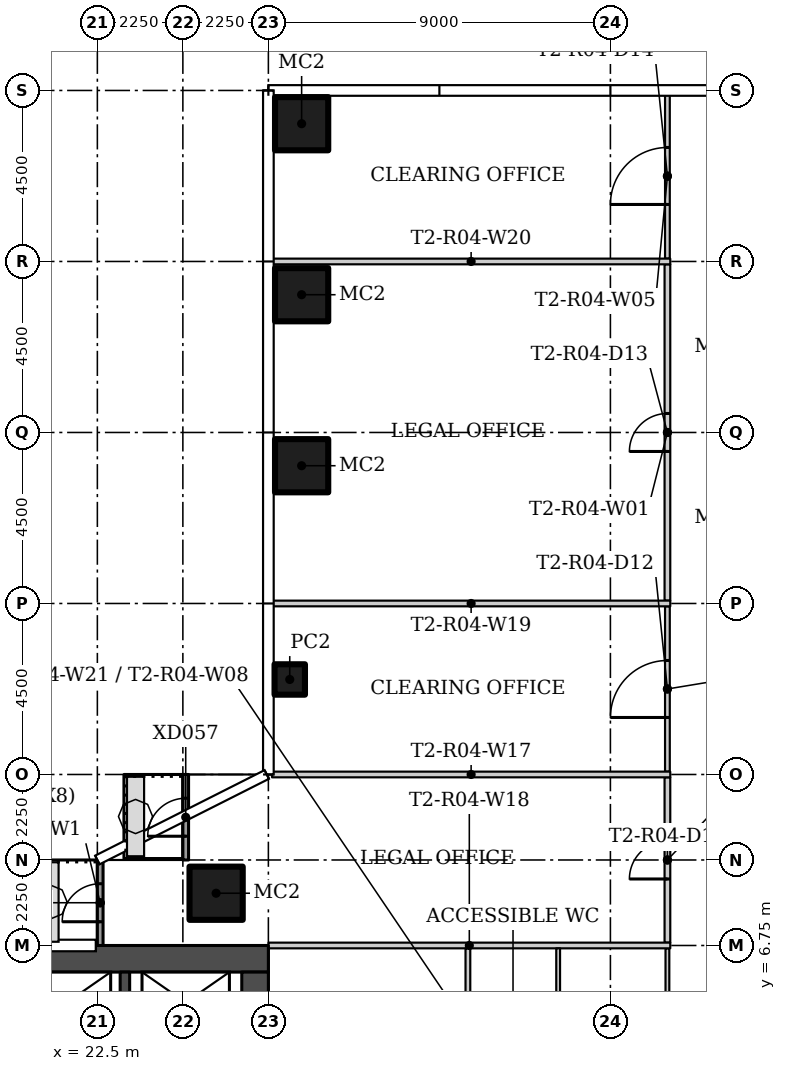
"""IFC4 building model, lengths in metres.
Left out: names, types, materials, properties, quantities, classifications, styles, units other than length and angle.
Written with IfcOpenShell. Run it as: python <this file> out.ifc"""

import sys

from ifc_helpers import new_model, si_unit, direction, frame, frame_2d, origin, origin_2d, place, context, subcontext, project, spatial, rectangle, hollow_rectangle, extrude, element, fill, save


model = new_model("IFC4")
c1 = context("Model", 3, precision=1e-05, world=origin(), true_north=direction((0.0, 1.0)))
c2 = subcontext(c1, "Body", "Model", "MODEL_VIEW")
j1 = project(units=[si_unit("LENGTHUNIT", "METRE"), si_unit("PLANEANGLEUNIT", "RADIAN")], contexts=[c1])
p1 = place(None, origin())
s1 = spatial("IfcSite", under=j1, at=p1, CompositionType="ELEMENT")
p2 = place(p1, origin())
s2 = spatial("IfcBuilding", under=s1, at=p2, CompositionType="ELEMENT")
p3 = place(p2, frame((0.0, 0.0, 49.8)))
s3 = spatial("IfcBuildingStorey", under=s2, at=p3, CompositionType="ELEMENT", Elevation=49.8)
p4 = place(p3, frame((25.625, 8.125, 0.0)))
e1 = element("IfcColumn", 1, at=p4, inside=s3, PredefinedType="COLUMN", context=c2, shape_type="SweptSolid", body=[
    extrude(hollow_rectangle(XDim=1.4, YDim=1.4, WallThickness=0.05, at=origin_2d()), origin(), (0.0, 0.0, 1.0), 3.55),
])
p5 = place(p3, frame((27.562, 13.75, 0.0)))
e2 = element("IfcColumn", 2, at=p5, inside=s3, PredefinedType="COLUMN", context=c2, shape_type="SweptSolid", body=[
    extrude(hollow_rectangle(XDim=0.8, YDim=0.8, WallThickness=0.025, at=origin_2d()), origin(), (0.0, 0.0, 1.0), 3.55),
])
for number, where in (
    (3, (27.875, 19.375, 0.0)),
    (4, (27.875, 23.875, 0.0)),
    (5, (27.875, 28.375, 0.0)),
):
    element("IfcColumn", number, at=place(p3, frame(where)), inside=s3, PredefinedType="COLUMN", context=c2, shape_type="SweptSolid", body=[
        extrude(hollow_rectangle(XDim=1.4, YDim=1.4, WallThickness=0.05, at=origin_2d()), origin(), (0.0, 0.0, 1.0), 3.55),
    ])
p6 = place(p3, frame((37.5, 15.825, 0.0), z_axis=(0.0, 0.0, 1.0), x_axis=(0.0, 1.0, 0.0)))
e6 = element("IfcWall", 6, at=p6, inside=s3, PredefinedType="PARTITIONING", context=c2, shape_type="SweptSolid", body=[
    extrude(rectangle(XDim=8.85, YDim=0.15, at=frame_2d((4.425, 0.0))), origin(), (0.0, 0.0, 1.0), 3.55),
])
p7 = place(p6, frame((3.925, 0.0, 0.0)))
e7 = element("IfcOpeningElement", 7, at=p7, cuts=e6, PredefinedType="OPENING", context=c2, shape_type="SweptSolid", body=[
    extrude(rectangle(XDim=1.0, YDim=2.4, at=frame_2d((0.5, 1.2))), frame((0.0, 0.085, 0.0), z_axis=(0.0, -1.0, 0.0), x_axis=(1.0, 0.0, 0.0)), (0.0, 0.0, 1.0), 0.17),
])
p8 = place(p3, frame((37.5, 6.825, 0.0), z_axis=(0.0, 0.0, 1.0), x_axis=(0.0, 1.0, 0.0)))
e8 = element("IfcWall", 8, at=p8, inside=s3, PredefinedType="PARTITIONING", context=c2, shape_type="SweptSolid", body=[
    extrude(rectangle(XDim=4.35, YDim=0.15, at=frame_2d((2.175, 0.0))), origin(), (0.0, 0.0, 1.0), 3.55),
])
p9 = place(p8, frame((1.675, 0.0, 0.0)))
e9 = element("IfcOpeningElement", 9, at=p9, cuts=e8, PredefinedType="OPENING", context=c2, shape_type="SweptSolid", body=[
    extrude(rectangle(XDim=1.0, YDim=2.4, at=frame_2d((0.5, 1.2))), frame((0.0, 0.085, 0.0), z_axis=(0.0, -1.0, 0.0), x_axis=(1.0, 0.0, 0.0)), (0.0, 0.0, 1.0), 0.17),
])
p10 = place(p3, frame((37.5, 24.825, 0.0), z_axis=(0.0, 0.0, 1.0), x_axis=(0.0, 1.0, 0.0)))
e10 = element("IfcWall", 10, at=p10, inside=s3, PredefinedType="PARTITIONING", context=c2, shape_type="SweptSolid", body=[
    extrude(rectangle(XDim=4.33, YDim=0.125, at=frame_2d((2.165, 0.0))), origin(), (0.0, 0.0, 1.0), 3.55),
])
p11 = place(p10, frame((1.425, 0.0, 0.0)))
e11 = element("IfcOpeningElement", 11, at=p11, cuts=e10, PredefinedType="OPENING", context=c2, shape_type="SweptSolid", body=[
    extrude(rectangle(XDim=1.5, YDim=2.1, at=frame_2d((0.75, 1.05))), frame((0.0, 0.073, 0.0), z_axis=(0.0, -1.0, 0.0), x_axis=(1.0, 0.0, 0.0)), (0.0, 0.0, 1.0), 0.145),
])
p12 = place(p3, frame((37.5, 11.325, 0.0), z_axis=(0.0, 0.0, 1.0), x_axis=(0.0, 1.0, 0.0)))
e12 = element("IfcWall", 12, at=p12, inside=s3, PredefinedType="PARTITIONING", context=c2, shape_type="SweptSolid", body=[
    extrude(rectangle(XDim=4.35, YDim=0.125, at=frame_2d((2.175, 0.0))), origin(), (0.0, 0.0, 1.0), 3.55),
])
p13 = place(p12, frame((1.425, 0.0, 0.0)))
e13 = element("IfcOpeningElement", 13, at=p13, cuts=e12, PredefinedType="OPENING", context=c2, shape_type="SweptSolid", body=[
    extrude(rectangle(XDim=1.5, YDim=2.1, at=frame_2d((0.75, 1.05))), frame((0.0, 0.073, 0.0), z_axis=(0.0, -1.0, 0.0), x_axis=(1.0, 0.0, 0.0)), (0.0, 0.0, 1.0), 0.145),
])
p14 = place(p3, frame((37.5, 2.5, 0.0), z_axis=(0.0, 0.0, 1.0), x_axis=(0.0, 1.0, 0.0)))
e14 = element("IfcWall", 14, at=p14, inside=s3, PredefinedType="PARTITIONING", context=c2, shape_type="SweptSolid", body=[
    extrude(rectangle(XDim=4.175, YDim=0.1, at=frame_2d((2.087, 0.0))), origin(), (0.0, 0.0, 1.0), 3.55),
])
p15 = place(p3, frame((37.575, 11.25, 0.0), z_axis=(0.0, 0.0, 1.0), x_axis=(-1.0, 0.0, 0.0)))
e15 = element("IfcWall", 15, at=p15, inside=s3, PredefinedType="PARTITIONING", context=c2, shape_type="SweptSolid", body=[
    extrude(rectangle(XDim=10.48, YDim=0.15, at=frame_2d((5.24, 0.0))), origin(), (0.0, 0.0, 1.0), 3.55),
])
p16 = place(p3, frame((27.0, 6.75, 0.0)))
e16 = element("IfcWall", 16, at=p16, inside=s3, PredefinedType="PARTITIONING", context=c2, shape_type="SweptSolid", body=[
    extrude(rectangle(XDim=10.575, YDim=0.15, at=frame_2d((5.288, 0.0))), origin(), (0.0, 0.0, 1.0), 3.55),
])
for number, where, z_axis, x_axis in (
    (17, (37.575, 15.75, 0.0), (0.0, 0.0, 1.0), (-1.0, 0.0, 0.0)),
    (18, (37.575, 24.75, 0.0), (0.0, 0.0, 1.0), (-1.0, 0.0, 0.0)),
):
    element("IfcWall", number, at=place(p3, frame(where, z_axis=z_axis, x_axis=x_axis)), inside=s3, PredefinedType="PARTITIONING", context=c2, shape_type="SweptSolid", body=[
        extrude(rectangle(XDim=10.48, YDim=0.15, at=frame_2d((5.24, 0.0))), origin(), (0.0, 0.0, 1.0), 3.55),
    ])
p17 = place(p3, frame((34.625, 6.675, 0.0), z_axis=(0.0, 0.0, 1.0), x_axis=(0.0, -1.0, 0.0)))
e19 = element("IfcWall", 19, at=p17, inside=s3, PredefinedType="PARTITIONING", context=c2, shape_type="SweptSolid", body=[
    extrude(rectangle(XDim=4.175, YDim=0.1, at=frame_2d((2.087, 0.0))), origin(), (0.0, 0.0, 1.0), 3.55),
])
p18 = place(p3, frame((32.25, 6.675, 0.0), z_axis=(0.0, 0.0, 1.0), x_axis=(0.0, -1.0, 0.0)))
e20 = element("IfcWall", 20, at=p18, inside=s3, PredefinedType="PARTITIONING", context=c2, shape_type="SweptSolid", body=[
    extrude(rectangle(XDim=4.162, YDim=0.125, at=frame_2d((2.081, 0.0))), origin(), (0.0, 0.0, 1.0), 3.55),
])
p19 = place(p3, frame((24.825, 9.0, 0.0), z_axis=(0.0, 0.0, 1.0), x_axis=(0.0, 1.0, 0.0)))
e21 = element("IfcWall", 21, at=p19, inside=s3, PredefinedType="SOLIDWALL", context=c2, shape_type="SweptSolid", body=[
    extrude(rectangle(XDim=2.25, YDim=0.15, at=frame_2d((1.125, 0.0))), origin(), (0.0, 0.0, 1.0), 3.45),
])
p20 = place(p19, frame((0.625, 0.0, 0.0)))
e22 = element("IfcOpeningElement", 22, at=p20, cuts=e21, PredefinedType="OPENING", context=c2, shape_type="SweptSolid", body=[
    extrude(rectangle(XDim=1.0, YDim=2.4, at=frame_2d((0.5, 1.2))), frame((0.0, 0.085, 0.0), z_axis=(0.0, -1.0, 0.0), x_axis=(1.0, 0.0, 0.0)), (0.0, 0.0, 1.0), 0.17),
])
p21 = place(p3, frame((22.575, 6.743, 0.0), z_axis=(0.0, 0.0, 1.0), x_axis=(0.0, 1.0, 0.0)))
e23 = element("IfcWall", 23, at=p21, inside=s3, PredefinedType="SOLIDWALL", context=c2, shape_type="SweptSolid", body=[
    extrude(rectangle(XDim=2.257, YDim=0.15, at=frame_2d((1.128, 0.0))), origin(), (0.0, 0.0, 1.0), 3.45),
])
p22 = place(p21, frame((0.632, 0.0, 0.0)))
e24 = element("IfcOpeningElement", 24, at=p22, cuts=e23, PredefinedType="OPENING", context=c2, shape_type="SweptSolid", body=[
    extrude(rectangle(XDim=1.0, YDim=2.4, at=frame_2d((0.5, 1.2))), frame((0.0, 0.085, 0.0), z_axis=(0.0, -1.0, 0.0), x_axis=(1.0, 0.0, 0.0)), (0.0, 0.0, 1.0), 0.17),
])
p23 = place(p3, frame((13.5, 6.4, 0.0)))
e25 = element("IfcWall", 25, at=p23, inside=s3, PredefinedType="SHEAR", context=c2, shape_type="SweptSolid", body=[
    extrude(rectangle(XDim=13.5, YDim=0.7, at=frame_2d((6.75, 0.0))), origin(), (0.0, 0.0, 1.0), 3.55),
])
p24 = place(p3, frame((26.65, 6.05, 0.0), z_axis=(0.0, 0.0, 1.0), x_axis=(0.0, -1.0, 0.0)))
e26 = element("IfcWall", 26, at=p24, inside=s3, PredefinedType="SHEAR", context=c2, shape_type="SweptSolid", body=[
    extrude(rectangle(XDim=12.1, YDim=0.7, at=frame_2d((6.05, 0.0))), origin(), (0.0, 0.0, 1.0), 3.55),
])
p25 = place(p24, frame((10.1, 0.0, 0.0)))
e27 = element("IfcOpeningElement", 27, at=p25, cuts=e26, PredefinedType="OPENING", context=c2, shape_type="SweptSolid", body=[
    extrude(rectangle(XDim=1.2, YDim=2.1, at=frame_2d((0.6, 1.05))), frame((0.0, 0.36, 0.0), z_axis=(0.0, -1.0, 0.0), x_axis=(1.0, 0.0, 0.0)), (0.0, 0.0, 1.0), 0.72),
])
p26 = place(p24, frame((3.9, 0.0, 0.0)))
e28 = element("IfcOpeningElement", 28, at=p26, cuts=e26, PredefinedType="OPENING", context=c2, shape_type="SweptSolid", body=[
    extrude(rectangle(XDim=1.8, YDim=2.4, at=frame_2d((0.9, 1.2))), frame((0.0, 0.36, 0.0), z_axis=(0.0, -1.0, 0.0), x_axis=(1.0, 0.0, 0.0)), (0.0, 0.0, 1.0), 0.72),
])
p27 = place(p3, frame((23.225, 3.25, 0.0), z_axis=(0.0, 0.0, 1.0), x_axis=(0.0, 1.0, 0.0)))
e29 = element("IfcWall", 29, at=p27, inside=s3, PredefinedType="SHEAR", context=c2, shape_type="SweptSolid", body=[
    extrude(rectangle(XDim=2.8, YDim=0.25, at=frame_2d((1.4, 0.0))), origin(), (0.0, 0.0, 1.0), 3.55),
])
p28 = place(p9, origin())
e30 = element("IfcDoor", 30, at=p28, inside=s3, OperationType="SINGLE_SWING_RIGHT", PredefinedType="DOOR", context=c2, shape_type="SweptSolid", body=[
    extrude(rectangle(XDim=1.0, YDim=2.4, at=frame_2d((0.5, 1.2))), frame((0.0, 0.025, 0.0), z_axis=(0.0, -1.0, 0.0), x_axis=(1.0, 0.0, 0.0)), (0.0, 0.0, 1.0), 0.05),
])
fill(e9, e30)
p29 = place(p13, origin())
e31 = element("IfcDoor", 31, at=p29, inside=s3, OperationType="DOUBLE_DOOR_SINGLE_SWING", PredefinedType="DOOR", context=c2, shape_type="SweptSolid", body=[
    extrude(rectangle(XDim=1.5, YDim=2.1, at=frame_2d((0.75, 1.05))), frame((0.0, 0.025, 0.0), z_axis=(0.0, -1.0, 0.0), x_axis=(1.0, 0.0, 0.0)), (0.0, 0.0, 1.0), 0.05),
])
fill(e13, e31)
p30 = place(p7, origin())
e32 = element("IfcDoor", 32, at=p30, inside=s3, OperationType="SINGLE_SWING_RIGHT", PredefinedType="DOOR", context=c2, shape_type="SweptSolid", body=[
    extrude(rectangle(XDim=1.0, YDim=2.4, at=frame_2d((0.5, 1.2))), frame((0.0, 0.025, 0.0), z_axis=(0.0, -1.0, 0.0), x_axis=(1.0, 0.0, 0.0)), (0.0, 0.0, 1.0), 0.05),
])
fill(e7, e32)
p31 = place(p11, origin())
e33 = element("IfcDoor", 33, at=p31, inside=s3, OperationType="DOUBLE_DOOR_SINGLE_SWING", PredefinedType="DOOR", context=c2, shape_type="SweptSolid", body=[
    extrude(rectangle(XDim=1.5, YDim=2.1, at=frame_2d((0.75, 1.05))), frame((0.0, 0.025, 0.0), z_axis=(0.0, -1.0, 0.0), x_axis=(1.0, 0.0, 0.0)), (0.0, 0.0, 1.0), 0.05),
])
fill(e11, e33)
p32 = place(p20, origin())
e34 = element("IfcDoor", 34, at=p32, inside=s3, OperationType="SINGLE_SWING_RIGHT", PredefinedType="DOOR", context=c2, shape_type="SweptSolid", body=[
    extrude(rectangle(XDim=1.0, YDim=2.4, at=frame_2d((0.5, 1.2))), frame((0.0, 0.025, 0.0), z_axis=(0.0, -1.0, 0.0), x_axis=(1.0, 0.0, 0.0)), (0.0, 0.0, 1.0), 0.05),
])
fill(e22, e34)
p33 = place(p22, origin())
e35 = element("IfcDoor", 35, at=p33, inside=s3, OperationType="SINGLE_SWING_LEFT", PredefinedType="DOOR", context=c2, shape_type="SweptSolid", body=[
    extrude(rectangle(XDim=1.0, YDim=2.4, at=frame_2d((0.5, 1.2))), frame((0.0, 0.025, 0.0), z_axis=(0.0, -1.0, 0.0), x_axis=(1.0, 0.0, 0.0)), (0.0, 0.0, 1.0), 0.05),
])
fill(e24, e35)
save(model, sys.argv[1])
